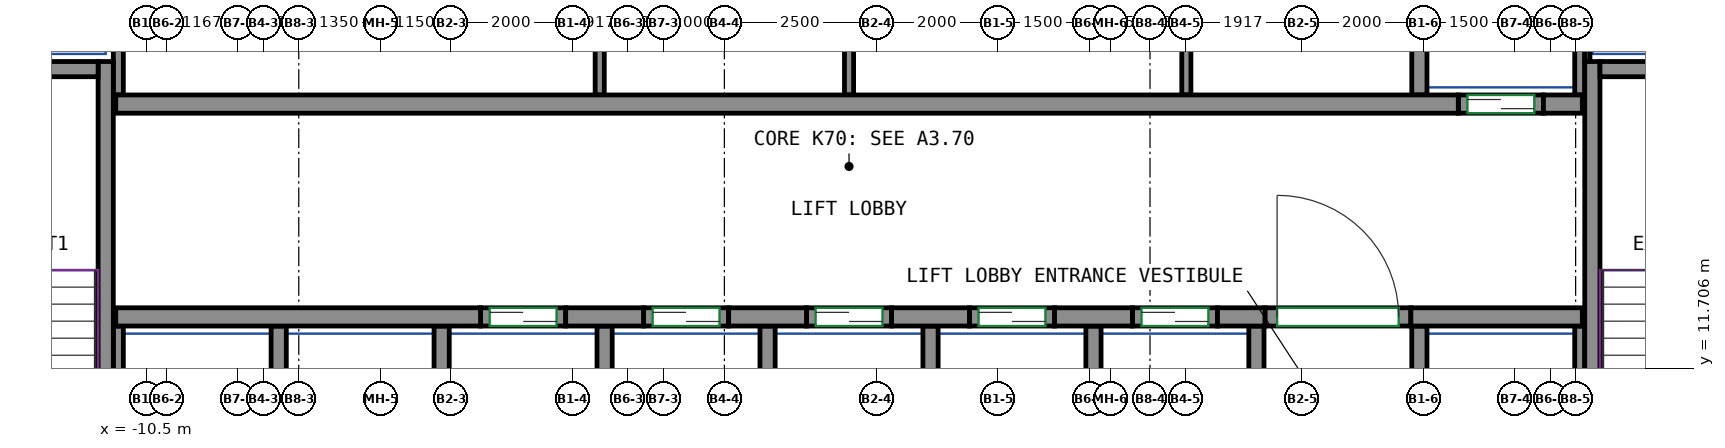
"""IFC4 building model, lengths in metres.
Left out: names, types, materials, properties, quantities, classifications, styles, units other than length and angle.
Written with IfcOpenShell. Run it as: python <this file> out.ifc"""

import sys

from ifc_helpers import new_model, si_unit, direction, frame, frame_2d, origin, place, context, subcontext, project, spatial, rectangle, extrude, source, transform, mapped, element, fill, save


model = new_model("IFC4")
c1 = context("Model", 3, precision=1e-05, world=origin(), true_north=direction((0.0, 1.0)))
c2 = subcontext(c1, "Body", "Model", "MODEL_VIEW")
j1 = project(units=[si_unit("LENGTHUNIT", "METRE"), si_unit("PLANEANGLEUNIT", "RADIAN")], contexts=[c1])
p1 = place(None, origin())
s1 = spatial("IfcSite", under=j1, at=p1, CompositionType="ELEMENT")
p2 = place(p1, origin())
s2 = spatial("IfcBuilding", under=s1, at=p2, CompositionType="ELEMENT")
p3 = place(p2, frame((0.0, 0.0, 280.6)))
s3 = spatial("IfcBuildingStorey", under=s2, at=p3, CompositionType="ELEMENT", Elevation=280.6)
m1 = source(origin(), c2, "Body", "SweptSolid", [
    extrude(rectangle(XDim=7.75, YDim=0.25, at=frame_2d((3.875, 0.0))), origin(), (0.0, 0.0, 1.0), 3.12),
])
p4 = place(p3, frame((-11.175, 9.0, 0.0), z_axis=(0.0, 0.0, 1.0), x_axis=(0.0, 1.0, 0.0)))
e1 = element("IfcWall", 1, at=p4, inside=s3, PredefinedType="SHEAR", context=c2, shape_type="MappedRepresentation", body=[
    mapped(m1, transform((0.0, 0.0, 0.0))),
])
m2 = source(origin(), c2, "Body", "SweptSolid", [
    extrude(rectangle(XDim=3.7, YDim=0.25, at=frame_2d((1.85, 0.0))), origin(), (0.0, 0.0, 1.0), 3.12),
])
p5 = place(p3, frame((-15.0, 16.625, 0.0), z_axis=(0.0, 0.0, 1.0), x_axis=(1.0, 0.0, 0.0)))
e2 = element("IfcWall", 2, at=p5, inside=s3, PredefinedType="SHEAR", context=c2, shape_type="MappedRepresentation", body=[
    mapped(m2, transform((0.0, 0.0, 0.0))),
])
p6 = place(p3, frame((13.275, 9.0, 0.0), z_axis=(0.0, 0.0, 1.0), x_axis=(0.0, 1.0, 0.0)))
e3 = element("IfcWall", 3, at=p6, inside=s3, PredefinedType="SHEAR", context=c2, shape_type="MappedRepresentation", body=[
    mapped(m1, transform((0.0, 0.0, 0.0))),
])
m3 = source(origin(), c2, "Body", "SweptSolid", [
    extrude(rectangle(XDim=3.7, YDim=0.25, at=frame_2d((1.85, 0.0))), origin(), (0.0, 0.0, 1.0), 3.12),
])
p7 = place(p3, frame((13.4, 16.625, 0.0), z_axis=(0.0, 0.0, 1.0), x_axis=(1.0, 0.0, 0.0)))
e4 = element("IfcWall", 4, at=p7, inside=s3, PredefinedType="SHEAR", context=c2, shape_type="MappedRepresentation", body=[
    mapped(m3, transform((0.0, 0.0, 0.0))),
])
m4 = source(origin(), c2, "Body", "SweptSolid", [
    extrude(rectangle(XDim=6.0, YDim=0.3, at=frame_2d((3.0, 0.0))), origin(), (0.0, 0.0, 1.0), 3.12),
])
p8 = place(p3, frame((-11.01, 12.55, 0.0), z_axis=(0.0, 0.0, 1.0), x_axis=(1.0, 0.0, 0.0)))
e5 = element("IfcWall", 5, at=p8, inside=s3, PredefinedType="SHEAR", context=c2, shape_type="MappedRepresentation", body=[
    mapped(m4, transform((0.0, 0.0, 0.0))),
])
m5 = source(origin(), c2, "Body", "SweptSolid", [
    extrude(rectangle(XDim=1.28, YDim=0.3, at=frame_2d((0.64, 0.0))), origin(), (0.0, 0.0, 1.0), 3.12),
])
for number, where, z_axis, x_axis in (
    (6, (-3.61, 12.55, 0.0), (0.0, 0.0, 1.0), (1.0, 0.0, 0.0)),
    (7, (-0.93, 12.55, 0.0), (0.0, 0.0, 1.0), (1.0, 0.0, 0.0)),
    (8, (1.75, 12.55, 0.0), (0.0, 0.0, 1.0), (1.0, 0.0, 0.0)),
    (9, (4.43, 12.55, 0.0), (0.0, 0.0, 1.0), (1.0, 0.0, 0.0)),
):
    element("IfcWall", number, at=place(p3, frame(where, z_axis=z_axis, x_axis=x_axis)), inside=s3, PredefinedType="SHEAR", context=c2, shape_type="MappedRepresentation", body=[
        mapped(m5, transform((0.0, 0.0, 0.0))),
    ])
m6 = source(origin(), c2, "Body", "SweptSolid", [
    extrude(rectangle(XDim=0.78, YDim=0.3, at=frame_2d((0.39, 0.0))), origin(), (0.0, 0.0, 1.0), 3.12),
])
p9 = place(p3, frame((7.11, 12.55, 0.0), z_axis=(0.0, 0.0, 1.0), x_axis=(1.0, 0.0, 0.0)))
e10 = element("IfcWall", 10, at=p9, inside=s3, PredefinedType="SHEAR", context=c2, shape_type="MappedRepresentation", body=[
    mapped(m6, transform((0.0, 0.0, 0.0))),
])
m7 = source(origin(), c2, "Body", "SweptSolid", [
    extrude(rectangle(XDim=2.82, YDim=0.3, at=frame_2d((1.41, 0.0))), origin(), (0.0, 0.0, 1.0), 3.12),
])
p10 = place(p3, frame((10.29, 12.55, 0.0), z_axis=(0.0, 0.0, 1.0), x_axis=(1.0, 0.0, 0.0)))
e11 = element("IfcWall", 11, at=p10, inside=s3, PredefinedType="SHEAR", context=c2, shape_type="MappedRepresentation", body=[
    mapped(m7, transform((0.0, 0.0, 0.0))),
])
m8 = source(origin(), c2, "Body", "SweptSolid", [
    extrude(rectangle(XDim=22.08, YDim=0.3, at=frame_2d((11.04, 0.0))), origin(), (0.0, 0.0, 1.0), 3.12),
])
p11 = place(p3, frame((-11.01, 16.05, 0.0), z_axis=(0.0, 0.0, 1.0), x_axis=(1.0, 0.0, 0.0)))
e12 = element("IfcWall", 12, at=p11, inside=s3, PredefinedType="SHEAR", context=c2, shape_type="MappedRepresentation", body=[
    mapped(m8, transform((0.0, 0.0, 0.0))),
])
m9 = source(origin(), c2, "Body", "SweptSolid", [
    extrude(rectangle(XDim=0.64, YDim=0.3, at=frame_2d((0.32, 0.0))), origin(), (0.0, 0.0, 1.0), 3.12),
])
p12 = place(p3, frame((12.47, 16.05, 0.0), z_axis=(0.0, 0.0, 1.0), x_axis=(1.0, 0.0, 0.0)))
e13 = element("IfcWall", 13, at=p12, inside=s3, PredefinedType="SHEAR", context=c2, shape_type="MappedRepresentation", body=[
    mapped(m9, transform((0.0, 0.0, 0.0))),
])
m10 = source(origin(), c2, "Body", "SweptSolid", [
    extrude(rectangle(XDim=1.4, YDim=0.3, at=frame_2d((0.7, 0.0))), origin(), (0.0, 0.0, 1.0), 3.12),
])
p13 = place(p3, frame((-5.01, 12.55, 0.0), z_axis=(0.0, 0.0, 1.0), x_axis=(1.0, 0.0, 0.0)))
e14 = element("IfcWall", 14, at=p13, inside=s3, PredefinedType="PARTITIONING", context=c2, shape_type="MappedRepresentation", body=[
    mapped(m10, transform((0.0, 0.0, 0.0))),
])
p14 = place(p13, frame((0.15, 0.0, 0.0)))
e15 = element("IfcOpeningElement", 15, at=p14, cuts=e14, PredefinedType="OPENING", context=c2, shape_type="SweptSolid", body=[
    extrude(rectangle(XDim=1.1, YDim=2.1, at=frame_2d((0.55, 1.05))), frame((0.0, 0.16, 0.0), z_axis=(0.0, -1.0, 0.0), x_axis=(1.0, 0.0, 0.0)), (0.0, 0.0, 1.0), 0.32),
])
m11 = source(origin(), c2, "Body", "SweptSolid", [
    extrude(rectangle(XDim=1.4, YDim=0.3, at=frame_2d((0.7, 0.0))), origin(), (0.0, 0.0, 1.0), 3.12),
])
p15 = place(p3, frame((-2.33, 12.55, 0.0), z_axis=(0.0, 0.0, 1.0), x_axis=(1.0, 0.0, 0.0)))
e16 = element("IfcWall", 16, at=p15, inside=s3, PredefinedType="PARTITIONING", context=c2, shape_type="MappedRepresentation", body=[
    mapped(m11, transform((0.0, 0.0, 0.0))),
])
p16 = place(p15, frame((0.15, 0.0, 0.0)))
e17 = element("IfcOpeningElement", 17, at=p16, cuts=e16, PredefinedType="OPENING", context=c2, shape_type="SweptSolid", body=[
    extrude(rectangle(XDim=1.1, YDim=2.1, at=frame_2d((0.55, 1.05))), frame((0.0, 0.16, 0.0), z_axis=(0.0, -1.0, 0.0), x_axis=(1.0, 0.0, 0.0)), (0.0, 0.0, 1.0), 0.32),
])
p17 = place(p3, frame((0.35, 12.55, 0.0), z_axis=(0.0, 0.0, 1.0), x_axis=(1.0, 0.0, 0.0)))
e18 = element("IfcWall", 18, at=p17, inside=s3, PredefinedType="PARTITIONING", context=c2, shape_type="MappedRepresentation", body=[
    mapped(m10, transform((0.0, 0.0, 0.0))),
])
p18 = place(p17, frame((0.15, 0.0, 0.0)))
e19 = element("IfcOpeningElement", 19, at=p18, cuts=e18, PredefinedType="OPENING", context=c2, shape_type="SweptSolid", body=[
    extrude(rectangle(XDim=1.1, YDim=2.1, at=frame_2d((0.55, 1.05))), frame((0.0, 0.16, 0.0), z_axis=(0.0, -1.0, 0.0), x_axis=(1.0, 0.0, 0.0)), (0.0, 0.0, 1.0), 0.32),
])
p19 = place(p3, frame((3.03, 12.55, 0.0), z_axis=(0.0, 0.0, 1.0), x_axis=(1.0, 0.0, 0.0)))
e20 = element("IfcWall", 20, at=p19, inside=s3, PredefinedType="PARTITIONING", context=c2, shape_type="MappedRepresentation", body=[
    mapped(m10, transform((0.0, 0.0, 0.0))),
])
p20 = place(p19, frame((0.15, 0.0, 0.0)))
e21 = element("IfcOpeningElement", 21, at=p20, cuts=e20, PredefinedType="OPENING", context=c2, shape_type="SweptSolid", body=[
    extrude(rectangle(XDim=1.1, YDim=2.1, at=frame_2d((0.55, 1.05))), frame((0.0, 0.16, 0.0), z_axis=(0.0, -1.0, 0.0), x_axis=(1.0, 0.0, 0.0)), (0.0, 0.0, 1.0), 0.32),
])
p21 = place(p3, frame((5.71, 12.55, 0.0), z_axis=(0.0, 0.0, 1.0), x_axis=(1.0, 0.0, 0.0)))
e22 = element("IfcWall", 22, at=p21, inside=s3, PredefinedType="PARTITIONING", context=c2, shape_type="MappedRepresentation", body=[
    mapped(m11, transform((0.0, 0.0, 0.0))),
])
p22 = place(p21, frame((0.15, 0.0, 0.0)))
e23 = element("IfcOpeningElement", 23, at=p22, cuts=e22, PredefinedType="OPENING", context=c2, shape_type="SweptSolid", body=[
    extrude(rectangle(XDim=1.1, YDim=2.1, at=frame_2d((0.55, 1.05))), frame((0.0, 0.16, 0.0), z_axis=(0.0, -1.0, 0.0), x_axis=(1.0, 0.0, 0.0)), (0.0, 0.0, 1.0), 0.32),
])
p23 = place(p3, frame((11.07, 16.05, 0.0), z_axis=(0.0, 0.0, 1.0), x_axis=(1.0, 0.0, 0.0)))
e24 = element("IfcWall", 24, at=p23, inside=s3, PredefinedType="PARTITIONING", context=c2, shape_type="MappedRepresentation", body=[
    mapped(m10, transform((0.0, 0.0, 0.0))),
])
p24 = place(p23, frame((0.15, 0.0, 0.0)))
e25 = element("IfcOpeningElement", 25, at=p24, cuts=e24, PredefinedType="OPENING", context=c2, shape_type="SweptSolid", body=[
    extrude(rectangle(XDim=1.1, YDim=2.1, at=frame_2d((0.55, 1.05))), frame((0.0, 0.16, 0.0), z_axis=(0.0, -1.0, 0.0), x_axis=(1.0, 0.0, 0.0)), (0.0, 0.0, 1.0), 0.32),
])
m12 = source(origin(), c2, "Body", "SweptSolid", [
    extrude(rectangle(XDim=2.4, YDim=0.3, at=frame_2d((1.2, 0.0))), origin(), (0.0, 0.0, 1.0), 3.12),
])
p25 = place(p3, frame((7.89, 12.55, 0.0), z_axis=(0.0, 0.0, 1.0), x_axis=(1.0, 0.0, 0.0)))
e26 = element("IfcWall", 26, at=p25, inside=s3, PredefinedType="PARTITIONING", context=c2, shape_type="MappedRepresentation", body=[
    mapped(m12, transform((0.0, 0.0, 0.0))),
])
p26 = place(p25, frame((0.2, 0.0, 0.0)))
e27 = element("IfcOpeningElement", 27, at=p26, cuts=e26, PredefinedType="OPENING", context=c2, shape_type="SweptSolid", body=[
    extrude(rectangle(XDim=2.0, YDim=2.1, at=frame_2d((1.0, 1.05))), frame((0.0, 0.16, 0.0), z_axis=(0.0, -1.0, 0.0), x_axis=(1.0, 0.0, 0.0)), (0.0, 0.0, 1.0), 0.32),
])
m13 = source(origin(), c2, "Body", "SweptSolid", [
    extrude(rectangle(XDim=3.275, YDim=0.165, at=frame_2d((1.638, 0.0))), origin(), (0.0, 0.0, 1.0), 3.12),
])
p27 = place(p3, frame((13.067, 16.2, 0.0), z_axis=(0.0, 0.0, 1.0), x_axis=(0.0, 1.0, 0.0)))
e28 = element("IfcWall", 28, at=p27, inside=s3, PredefinedType="PARTITIONING", context=c2, shape_type="MappedRepresentation", body=[
    mapped(m13, transform((0.0, 0.0, 0.0))),
])
m14 = source(origin(), c2, "Body", "SweptSolid", [
    extrude(rectangle(XDim=4.8, YDim=0.165, at=frame_2d((2.4, 0.0))), origin(), (0.0, 0.0, 1.0), 3.12),
])
p28 = place(p3, frame((-10.968, 16.2, 0.0), z_axis=(0.0, 0.0, 1.0), x_axis=(0.0, 1.0, 0.0)))
e29 = element("IfcWall", 29, at=p28, inside=s3, PredefinedType="PARTITIONING", context=c2, shape_type="MappedRepresentation", body=[
    mapped(m14, transform((0.0, 0.0, 0.0))),
])
m15 = source(origin(), c2, "Body", "SweptSolid", [
    extrude(rectangle(XDim=3.275, YDim=0.25, at=frame_2d((1.638, 0.0))), origin(), (0.0, 0.0, 1.0), 3.12),
])
p29 = place(p3, frame((10.43, 16.2, 0.0), z_axis=(0.0, 0.0, 1.0), x_axis=(0.0, 1.0, 0.0)))
e30 = element("IfcWall", 30, at=p29, inside=s3, PredefinedType="PARTITIONING", context=c2, shape_type="MappedRepresentation", body=[
    mapped(m15, transform((0.0, 0.0, 0.0))),
])
m16 = source(origin(), c2, "Body", "SweptSolid", [
    extrude(rectangle(XDim=2.725, YDim=0.085, at=frame_2d((1.363, 0.0))), origin(), (0.0, 0.0, 1.0), 3.12),
])
p30 = place(p3, frame((13.192, 16.75, 0.0), z_axis=(0.0, 0.0, 1.0), x_axis=(0.0, 1.0, 0.0)))
e31 = element("IfcWall", 31, at=p30, inside=s3, PredefinedType="PARTITIONING", context=c2, shape_type="MappedRepresentation", body=[
    mapped(m16, transform((0.0, 0.0, 0.0))),
])
m17 = source(origin(), c2, "Body", "SweptSolid", [
    extrude(rectangle(XDim=3.4, YDim=0.25, at=frame_2d((1.7, 0.0))), origin(), (0.0, 0.0, 1.0), 3.12),
])
p31 = place(p3, frame((10.43, 9.0, 0.0), z_axis=(0.0, 0.0, 1.0), x_axis=(0.0, 1.0, 0.0)))
e32 = element("IfcWall", 32, at=p31, inside=s3, PredefinedType="PARTITIONING", context=c2, shape_type="MappedRepresentation", body=[
    mapped(m17, transform((0.0, 0.0, 0.0))),
])
m18 = source(origin(), c2, "Body", "SweptSolid", [
    extrude(rectangle(XDim=3.4, YDim=0.165, at=frame_2d((1.7, 0.0))), origin(), (0.0, 0.0, 1.0), 3.12),
])
p32 = place(p3, frame((13.067, 9.0, 0.0), z_axis=(0.0, 0.0, 1.0), x_axis=(0.0, 1.0, 0.0)))
e33 = element("IfcWall", 33, at=p32, inside=s3, PredefinedType="PARTITIONING", context=c2, shape_type="MappedRepresentation", body=[
    mapped(m18, transform((0.0, 0.0, 0.0))),
])
for number, where, z_axis, x_axis in (
    (34, (2.39, 9.0, 0.0), (0.0, 0.0, 1.0), (0.0, 1.0, 0.0)),
    (35, (5.07, 9.0, 0.0), (0.0, 0.0, 1.0), (0.0, 1.0, 0.0)),
    (36, (7.75, 9.0, 0.0), (0.0, 0.0, 1.0), (0.0, 1.0, 0.0)),
    (37, (-0.29, 9.0, 0.0), (0.0, 0.0, 1.0), (0.0, 1.0, 0.0)),
):
    element("IfcWall", number, at=place(p3, frame(where, z_axis=z_axis, x_axis=x_axis)), inside=s3, PredefinedType="PARTITIONING", context=c2, shape_type="MappedRepresentation", body=[
        mapped(m17, transform((0.0, 0.0, 0.0))),
    ])
p33 = place(p3, frame((-10.968, 9.0, 0.0), z_axis=(0.0, 0.0, 1.0), x_axis=(0.0, 1.0, 0.0)))
e38 = element("IfcWall", 38, at=p33, inside=s3, PredefinedType="PARTITIONING", context=c2, shape_type="MappedRepresentation", body=[
    mapped(m18, transform((0.0, 0.0, 0.0))),
])
for number, where, z_axis, x_axis in (
    (39, (-2.97, 9.0, 0.0), (0.0, 0.0, 1.0), (0.0, 1.0, 0.0)),
    (40, (-5.65, 9.0, 0.0), (0.0, 0.0, 1.0), (0.0, 1.0, 0.0)),
    (41, (-8.33, 9.0, 0.0), (0.0, 0.0, 1.0), (0.0, 1.0, 0.0)),
):
    element("IfcWall", number, at=place(p3, frame(where, z_axis=z_axis, x_axis=x_axis)), inside=s3, PredefinedType="PARTITIONING", context=c2, shape_type="MappedRepresentation", body=[
        mapped(m17, transform((0.0, 0.0, 0.0))),
    ])
m19 = source(origin(), c2, "Body", "SweptSolid", [
    extrude(rectangle(XDim=4.8, YDim=0.15, at=frame_2d((2.4, 0.0))), origin(), (0.0, 0.0, 1.0), 3.12),
])
for number, where, z_axis, x_axis in (
    (42, (-3.05, 16.2, 0.0), (0.0, 0.0, 1.0), (0.0, 1.0, 0.0)),
    (43, (1.05, 16.2, 0.0), (0.0, 0.0, 1.0), (0.0, 1.0, 0.0)),
    (44, (6.598, 16.2, 0.0), (0.0, 0.0, 1.0), (0.0, 1.0, 0.0)),
):
    element("IfcWall", number, at=place(p3, frame(where, z_axis=z_axis, x_axis=x_axis)), inside=s3, PredefinedType="PARTITIONING", context=c2, shape_type="MappedRepresentation", body=[
        mapped(m19, transform((0.0, 0.0, 0.0))),
    ])
p34 = place(p26, origin())
e45 = element("IfcDoor", 45, at=p34, inside=s3, OperationType="DOUBLE_DOOR_SINGLE_SWING", PredefinedType="DOOR", context=c2, shape_type="SweptSolid", body=[
    extrude(rectangle(XDim=2.0, YDim=2.1, at=frame_2d((1.0, 1.05))), frame((0.0, 0.025, 0.0), z_axis=(0.0, -1.0, 0.0), x_axis=(1.0, 0.0, 0.0)), (0.0, 0.0, 1.0), 0.05),
])
fill(e27, e45)
p35 = place(p14, origin())
e46 = element("IfcDoor", 46, at=p35, inside=s3, OperationType="DOUBLE_DOOR_SLIDING", PredefinedType="DOOR", context=c2, shape_type="SweptSolid", body=[
    extrude(rectangle(XDim=1.1, YDim=2.1, at=frame_2d((0.55, 1.05))), frame((0.0, 0.025, 0.0), z_axis=(0.0, -1.0, 0.0), x_axis=(1.0, 0.0, 0.0)), (0.0, 0.0, 1.0), 0.05),
])
fill(e15, e46)
p36 = place(p16, origin())
e47 = element("IfcDoor", 47, at=p36, inside=s3, OperationType="DOUBLE_DOOR_SLIDING", PredefinedType="DOOR", context=c2, shape_type="SweptSolid", body=[
    extrude(rectangle(XDim=1.1, YDim=2.1, at=frame_2d((0.55, 1.05))), frame((0.0, 0.025, 0.0), z_axis=(0.0, -1.0, 0.0), x_axis=(1.0, 0.0, 0.0)), (0.0, 0.0, 1.0), 0.05),
])
fill(e17, e47)
p37 = place(p18, origin())
e48 = element("IfcDoor", 48, at=p37, inside=s3, OperationType="DOUBLE_DOOR_SLIDING", PredefinedType="DOOR", context=c2, shape_type="SweptSolid", body=[
    extrude(rectangle(XDim=1.1, YDim=2.1, at=frame_2d((0.55, 1.05))), frame((0.0, 0.025, 0.0), z_axis=(0.0, -1.0, 0.0), x_axis=(1.0, 0.0, 0.0)), (0.0, 0.0, 1.0), 0.05),
])
fill(e19, e48)
p38 = place(p20, origin())
e49 = element("IfcDoor", 49, at=p38, inside=s3, OperationType="DOUBLE_DOOR_SLIDING", PredefinedType="DOOR", context=c2, shape_type="SweptSolid", body=[
    extrude(rectangle(XDim=1.1, YDim=2.1, at=frame_2d((0.55, 1.05))), frame((0.0, 0.025, 0.0), z_axis=(0.0, -1.0, 0.0), x_axis=(1.0, 0.0, 0.0)), (0.0, 0.0, 1.0), 0.05),
])
fill(e21, e49)
p39 = place(p22, origin())
e50 = element("IfcDoor", 50, at=p39, inside=s3, OperationType="DOUBLE_DOOR_SLIDING", PredefinedType="DOOR", context=c2, shape_type="SweptSolid", body=[
    extrude(rectangle(XDim=1.1, YDim=2.1, at=frame_2d((0.55, 1.05))), frame((0.0, 0.025, 0.0), z_axis=(0.0, -1.0, 0.0), x_axis=(1.0, 0.0, 0.0)), (0.0, 0.0, 1.0), 0.05),
])
fill(e23, e50)
p40 = place(p24, origin())
e51 = element("IfcDoor", 51, at=p40, inside=s3, OperationType="DOUBLE_DOOR_SLIDING", PredefinedType="DOOR", context=c2, shape_type="SweptSolid", body=[
    extrude(rectangle(XDim=1.1, YDim=2.1, at=frame_2d((0.55, 1.05))), frame((0.0, 0.025, 0.0), z_axis=(0.0, -1.0, 0.0), x_axis=(1.0, 0.0, 0.0)), (0.0, 0.0, 1.0), 0.05),
])
fill(e25, e51)
save(model, sys.argv[1])
